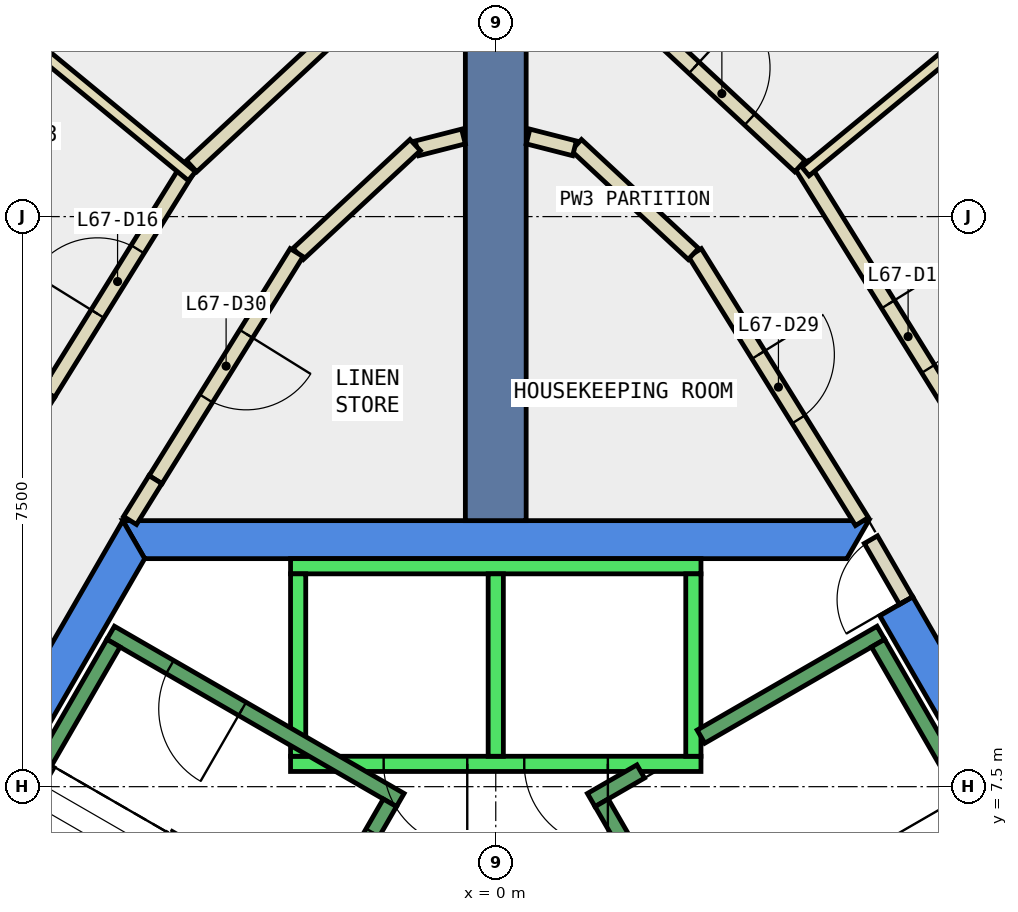
"""IFC4 building model, lengths in metres.
Left out: names, types, materials, properties, quantities, classifications, styles, units other than length and angle.
Written with IfcOpenShell. Run it as: python <this file> out.ifc"""

import sys

from ifc_helpers import new_model, si_unit, direction, frame, frame_2d, origin, place, context, subcontext, project, spatial, polyline, rectangle, outline, extrude, element, fill, save


model = new_model("IFC4")
c1 = context("Model", 3, precision=1e-05, world=origin(), true_north=direction((0.0, 1.0)))
c2 = subcontext(c1, "Body", "Model", "MODEL_VIEW")
j1 = project(units=[si_unit("LENGTHUNIT", "METRE"), si_unit("PLANEANGLEUNIT", "RADIAN")], contexts=[c1])
p1 = place(None, origin())
s1 = spatial("IfcSite", under=j1, at=p1, CompositionType="ELEMENT")
p2 = place(p1, origin())
s2 = spatial("IfcBuilding", under=s1, at=p2, CompositionType="ELEMENT")
p3 = place(p2, frame((0.0, 0.0, 290.0)))
s3 = spatial("IfcBuildingStorey", under=s2, at=p3, CompositionType="ELEMENT", Elevation=290.0)
p4 = place(p3, frame((0.0, 0.0, -0.34)))
e1 = element("IfcWall", 1, at=p4, inside=s3, PredefinedType="SHEAR", context=c2, shape_type="SweptSolid", body=[
    extrude(outline(polyline([(5.486, 9.998), (5.053, 9.748), (9.238, 2.5), (9.815, 2.5), (5.486, 9.998)])), origin(), (0.0, 0.0, 1.0), 3.6),
])
p5 = place(p3, frame((0.0, 0.0, -0.34)))
e2 = element("IfcWall", 2, at=p5, inside=s3, PredefinedType="SHEAR", context=c2, shape_type="SweptSolid", body=[
    extrude(outline(polyline([(4.907, 11.0), (-4.907, 11.0), (-4.619, 10.5), (4.619, 10.5), (4.907, 11.0)])), origin(), (0.0, 0.0, 1.0), 3.6),
])
p6 = place(p3, frame((0.0, 0.0, -0.34)))
e3 = element("IfcWall", 3, at=p6, inside=s3, PredefinedType="SHEAR", context=c2, shape_type="SweptSolid", body=[
    extrude(outline(polyline([(-9.236, 3.502), (-8.803, 3.253), (-4.619, 10.5), (-4.907, 11.0), (-9.236, 3.502)])), origin(), (0.0, 0.0, 1.0), 3.6),
])
p7 = place(p3, frame((0.0, 11.0, -0.34), z_axis=(0.0, 0.0, 1.0), x_axis=(0.0, 1.0, 0.0)))
e4 = element("IfcWall", 4, at=p7, inside=s3, PredefinedType="SHEAR", context=c2, shape_type="SweptSolid", body=[
    extrude(rectangle(XDim=9.0, YDim=0.8, at=frame_2d((4.5, 0.0))), origin(), (0.0, 0.0, 1.0), 3.6),
])
p8 = place(p3, frame((2.62, 14.526, 0.0), z_axis=(0.0, 0.0, 1.0), x_axis=(0.527726136463, -0.84941457775, 0.0)))
e5 = element("IfcWall", 5, at=p8, inside=s3, PredefinedType="PARTITIONING", context=c2, shape_type="SweptSolid", body=[
    extrude(rectangle(XDim=4.165, YDim=0.2, at=frame_2d((2.083, 0.0))), origin(), (0.0, 0.0, 1.0), 2.4),
])
p9 = place(p8, frame((1.583, 0.0, 0.0)))
e6 = element("IfcOpeningElement", 6, at=p9, cuts=e5, PredefinedType="OPENING", context=c2, shape_type="SweptSolid", body=[
    extrude(rectangle(XDim=1.0, YDim=2.1, at=frame_2d((0.5, 1.05))), frame((0.0, 0.11, 0.0), z_axis=(0.0, -1.0, 0.0), x_axis=(1.0, 0.0, 0.0)), (0.0, 0.0, 1.0), 0.22),
])
p10 = place(p3, frame((2.6, 14.509, 0.0), z_axis=(0.0, 0.0, 1.0), x_axis=(-0.732355024595, 0.680922989735, 0.0)))
e7 = element("IfcWall", 7, at=p10, inside=s3, PredefinedType="PARTITIONING", context=c2, shape_type="SweptSolid", body=[
    extrude(rectangle(XDim=2.103, YDim=0.2, at=frame_2d((1.051, 0.0))), origin(), (0.0, 0.0, 1.0), 3.26),
])
for number, where, z_axis, x_axis in (
    (8, (1.036, 15.898, 0.0), (0.0, 0.0, 1.0), (-0.969, 0.247, 0.0)),
    (9, (-0.425, 16.054, 0.0), (0.0, 0.0, 1.0), (-0.969, -0.247, 0.0)),
):
    element("IfcWall", number, at=place(p3, frame(where, z_axis=z_axis, x_axis=x_axis)), inside=s3, PredefinedType="PARTITIONING", context=c2, shape_type="SweptSolid", body=[
        extrude(rectangle(XDim=0.63, YDim=0.2, at=frame_2d((0.315, 0.0))), origin(), (0.0, 0.0, 1.0), 3.26),
    ])
p11 = place(p3, frame((-1.06, 15.941, 0.0), z_axis=(0.0, 0.0, 1.0), x_axis=(-0.732355024595, -0.680922989735, 0.0)))
e10 = element("IfcWall", 10, at=p11, inside=s3, PredefinedType="PARTITIONING", context=c2, shape_type="SweptSolid", body=[
    extrude(rectangle(XDim=2.103, YDim=0.2, at=frame_2d((1.051, 0.0))), origin(), (0.0, 0.0, 1.0), 3.26),
])
p12 = place(p3, frame((-2.62, 14.526, 0.0), z_axis=(0.0, 0.0, 1.0), x_axis=(-0.527787942423, -0.849376175692, 0.0)))
e11 = element("IfcWall", 11, at=p12, inside=s3, PredefinedType="PARTITIONING", context=c2, shape_type="SweptSolid", body=[
    extrude(rectangle(XDim=3.517, YDim=0.2, at=frame_2d((1.758, 0.0))), origin(), (0.0, 0.0, 1.0), 3.26),
])
p13 = place(p12, frame((1.258, 0.0, 0.0)))
e12 = element("IfcOpeningElement", 12, at=p13, cuts=e11, PredefinedType="OPENING", context=c2, shape_type="SweptSolid", body=[
    extrude(rectangle(XDim=1.0, YDim=2.1, at=frame_2d((0.5, 1.05))), frame((0.0, 0.11, 0.0), z_axis=(0.0, -1.0, 0.0), x_axis=(1.0, 0.0, 0.0)), (0.0, 0.0, 1.0), 0.22),
])
p14 = place(p3, frame((-4.478, 11.54, 0.0), z_axis=(0.0, 0.0, 1.0), x_axis=(-0.527362861778, -0.849640166198, 0.0)))
e13 = element("IfcWall", 13, at=p14, inside=s3, PredefinedType="PARTITIONING", context=c2, shape_type="SweptSolid", body=[
    extrude(rectangle(XDim=0.633, YDim=0.2, at=frame_2d((0.317, 0.0))), origin(), (0.0, 0.0, 1.0), 3.26),
])
p15 = place(p3, frame((4.022, 15.68, 0.0), z_axis=(0.0, 0.0, 1.0), x_axis=(0.527737948498, -0.849407239029, 0.0)))
e14 = element("IfcWall", 14, at=p15, inside=s3, PredefinedType="PARTITIONING", context=c2, shape_type="SweptSolid", body=[
    extrude(rectangle(XDim=5.217, YDim=0.2, at=frame_2d((2.608, 0.0))), origin(), (0.0, 0.0, 1.0), 3.26),
])
p16 = place(p15, frame((2.159, 0.0, 0.0)))
e15 = element("IfcOpeningElement", 15, at=p16, cuts=e14, PredefinedType="OPENING", context=c2, shape_type="SweptSolid", body=[
    extrude(rectangle(XDim=1.0, YDim=2.1, at=frame_2d((0.5, 1.05))), frame((0.0, 0.11, 0.0), z_axis=(0.0, -1.0, 0.0), x_axis=(1.0, 0.0, 0.0)), (0.0, 0.0, 1.0), 0.22),
])
p17 = place(p3, frame((1.949, 17.572, 0.0), z_axis=(0.0, 0.0, 1.0), x_axis=(0.732331154554, -0.680948661846, 0.0)))
e16 = element("IfcWall", 16, at=p17, inside=s3, PredefinedType="PARTITIONING", context=c2, shape_type="SweptSolid", body=[
    extrude(rectangle(XDim=2.803, YDim=0.2, at=frame_2d((1.402, 0.0))), origin(), (0.0, 0.0, 1.0), 3.26),
])
p18 = place(p17, frame((0.901, 0.0, 0.0)))
e17 = element("IfcOpeningElement", 17, at=p18, cuts=e16, PredefinedType="OPENING", context=c2, shape_type="SweptSolid", body=[
    extrude(rectangle(XDim=1.0, YDim=2.1, at=frame_2d((0.5, 1.05))), frame((0.0, 0.11, 0.0), z_axis=(0.0, -1.0, 0.0), x_axis=(1.0, 0.0, 0.0)), (0.0, 0.0, 1.0), 0.22),
])
p19 = place(p3, frame((-4.002, 15.663, 0.0), z_axis=(0.0, 0.0, 1.0), x_axis=(0.732331154554, 0.680948661846, 0.0)))
e18 = element("IfcWall", 18, at=p19, inside=s3, PredefinedType="PARTITIONING", context=c2, shape_type="SweptSolid", body=[
    extrude(rectangle(XDim=2.803, YDim=0.2, at=frame_2d((1.402, 0.0))), origin(), (0.0, 0.0, 1.0), 3.26),
])
p20 = place(p3, frame((-5.889, 12.675, 0.0), z_axis=(0.0, 0.0, 1.0), x_axis=(0.527550626699, 0.849523593709, 0.0)))
e19 = element("IfcWall", 19, at=p20, inside=s3, PredefinedType="PARTITIONING", context=c2, shape_type="SweptSolid", body=[
    extrude(rectangle(XDim=3.463, YDim=0.2, at=frame_2d((1.731, 0.0))), origin(), (0.0, 0.0, 1.0), 3.26),
])
p21 = place(p20, frame((1.231, 0.0, 0.0)))
e20 = element("IfcOpeningElement", 20, at=p21, cuts=e19, PredefinedType="OPENING", context=c2, shape_type="SweptSolid", body=[
    extrude(rectangle(XDim=1.0, YDim=2.1, at=frame_2d((0.5, 1.05))), frame((0.0, 0.11, 0.0), z_axis=(0.0, -1.0, 0.0), x_axis=(1.0, 0.0, 0.0)), (0.0, 0.0, 1.0), 0.22),
])
p22 = place(p3, frame((-7.472, 10.127, 0.0), z_axis=(0.0, 0.0, 1.0), x_axis=(0.527707224705, 0.849426326996, 0.0)))
e21 = element("IfcWall", 21, at=p22, inside=s3, PredefinedType="PARTITIONING", context=c2, shape_type="SweptSolid", body=[
    extrude(rectangle(XDim=3.0, YDim=0.2, at=frame_2d((1.5, 0.0))), origin(), (0.0, 0.0, 1.0), 3.26),
])
p23 = place(p3, frame((4.075, 15.595, 0.0), z_axis=(0.0, 0.0, 1.0), x_axis=(0.771899326406, 0.635744783616, 0.0)))
e22 = element("IfcWall", 22, at=p23, inside=s3, PredefinedType="PARTITIONING", context=c2, shape_type="SweptSolid", body=[
    extrude(rectangle(XDim=4.332, YDim=0.15, at=frame_2d((2.166, 0.0))), origin(), (0.0, 0.0, 1.0), 3.26),
])
p24 = place(p3, frame((-3.998, 15.532, 0.0), z_axis=(0.0, 0.0, 1.0), x_axis=(-0.771938186867, 0.635697597649, 0.0)))
e23 = element("IfcWall", 23, at=p24, inside=s3, PredefinedType="PARTITIONING", context=c2, shape_type="SweptSolid", body=[
    extrude(rectangle(XDim=4.432, YDim=0.15, at=frame_2d((2.216, 0.0))), origin(), (0.0, 0.0, 1.0), 3.26),
])
p25 = place(p3, frame((5.399, 9.948, 0.0), z_axis=(0.0, 0.0, 1.0), x_axis=(-0.499882215713, 0.866093395895, 0.0)))
e24 = element("IfcWall", 24, at=p25, inside=s3, PredefinedType="PARTITIONING", context=c2, shape_type="SweptSolid", body=[
    extrude(rectangle(XDim=0.926, YDim=0.2, at=frame_2d((0.463, 0.0))), origin(), (0.0, 0.0, 1.0), 2.4),
])
p26 = place(p25, frame((0.017, 0.0, 0.0)))
e25 = element("IfcOpeningElement", 25, at=p26, cuts=e24, PredefinedType="OPENING", context=c2, shape_type="SweptSolid", body=[
    extrude(rectangle(XDim=0.9, YDim=2.1, at=frame_2d((0.45, 1.05))), frame((0.0, 0.11, 0.0), z_axis=(0.0, -1.0, 0.0), x_axis=(1.0, 0.0, 0.0)), (0.0, 0.0, 1.0), 0.22),
])
p27 = place(p3, frame((2.7, 7.8, 0.0), z_axis=(0.0, 0.0, 1.0), x_axis=(-1.0, 0.0, 0.0)))
e26 = element("IfcWall", 26, at=p27, inside=s3, PredefinedType="STANDARD", context=c2, shape_type="SweptSolid", body=[
    extrude(rectangle(XDim=5.4, YDim=0.2, at=frame_2d((2.7, 0.0))), origin(), (0.0, 0.0, 1.0), 3.26),
])
p28 = place(p27, frame((1.225, 0.0, 0.0)))
e27 = element("IfcOpeningElement", 27, at=p28, cuts=e26, PredefinedType="OPENING", context=c2, shape_type="SweptSolid", body=[
    extrude(rectangle(XDim=1.1, YDim=2.1, at=frame_2d((0.55, 1.05))), frame((0.0, 0.11, 0.0), z_axis=(0.0, -1.0, 0.0), x_axis=(1.0, 0.0, 0.0)), (0.0, 0.0, 1.0), 0.22),
])
p29 = place(p27, frame((3.075, 0.0, 0.0)))
e28 = element("IfcOpeningElement", 28, at=p29, cuts=e26, PredefinedType="OPENING", context=c2, shape_type="SweptSolid", body=[
    extrude(rectangle(XDim=1.1, YDim=2.1, at=frame_2d((0.55, 1.05))), frame((0.0, 0.11, 0.0), z_axis=(0.0, -1.0, 0.0), x_axis=(1.0, 0.0, 0.0)), (0.0, 0.0, 1.0), 0.22),
])
p30 = place(p3, frame((2.7, 10.4, 0.0), z_axis=(0.0, 0.0, 1.0), x_axis=(-1.0, 0.0, 0.0)))
e29 = element("IfcWall", 29, at=p30, inside=s3, PredefinedType="STANDARD", context=c2, shape_type="SweptSolid", body=[
    extrude(rectangle(XDim=5.4, YDim=0.2, at=frame_2d((2.7, 0.0))), origin(), (0.0, 0.0, 1.0), 3.26),
])
for number, where, z_axis, x_axis in (
    (30, (2.6, 7.9, 0.0), (0.0, 0.0, 1.0), (0.0, 1.0, 0.0)),
    (31, (0.0, 7.9, 0.0), (0.0, 0.0, 1.0), (0.0, 1.0, 0.0)),
    (32, (-2.6, 7.9, 0.0), (0.0, 0.0, 1.0), (0.0, 1.0, 0.0)),
):
    element("IfcWall", number, at=place(p3, frame(where, z_axis=z_axis, x_axis=x_axis)), inside=s3, PredefinedType="STANDARD", context=c2, shape_type="SweptSolid", body=[
        extrude(rectangle(XDim=2.4, YDim=0.2, at=frame_2d((1.2, 0.0))), origin(), (0.0, 0.0, 1.0), 3.26),
    ])
p31 = place(p3, frame((2.7, 8.158, 0.0), z_axis=(0.0, 0.0, 1.0), x_axis=(0.86611865017, 0.499838457731, 0.0)))
e33 = element("IfcWall", 33, at=p31, inside=s3, PredefinedType="STANDARD", context=c2, shape_type="SweptSolid", body=[
    extrude(rectangle(XDim=2.733, YDim=0.2, at=frame_2d((1.366, 0.0))), origin(), (0.0, 0.0, 1.0), 3.26),
])
p32 = place(p3, frame((1.256, 7.324, 0.0), z_axis=(0.0, 0.0, 1.0), x_axis=(0.865915093549, 0.500191014278, 0.0)))
e34 = element("IfcWall", 34, at=p32, inside=s3, PredefinedType="STANDARD", context=c2, shape_type="SweptSolid", body=[
    extrude(rectangle(XDim=0.752, YDim=0.2, at=frame_2d((0.376, 0.0))), origin(), (0.0, 0.0, 1.0), 3.26),
])
p33 = place(p3, frame((4.843, 1.312, 0.0), z_axis=(0.0, 0.0, 1.0), x_axis=(-0.499963383562, 0.866046543262, 0.0)))
e35 = element("IfcWall", 35, at=p33, inside=s3, PredefinedType="STANDARD", context=c2, shape_type="SweptSolid", body=[
    extrude(rectangle(XDim=6.9, YDim=0.2, at=frame_2d((3.45, 0.0))), origin(), (0.0, 0.0, 1.0), 3.26),
])
p34 = place(p33, frame((0.45, 0.0, 0.0)))
e36 = element("IfcOpeningElement", 36, at=p34, cuts=e35, PredefinedType="OPENING", context=c2, shape_type="SweptSolid", body=[
    extrude(rectangle(XDim=1.1, YDim=2.2, at=frame_2d((0.55, 1.1))), frame((0.0, 0.11, 0.0), z_axis=(0.0, -1.0, 0.0), x_axis=(1.0, 0.0, 0.0)), (0.0, 0.0, 1.0), 0.22),
])
p35 = place(p3, frame((8.48, 3.412, 0.0), z_axis=(0.0, 0.0, 1.0), x_axis=(-0.499978703459, 0.866037698999, 0.0)))
e37 = element("IfcWall", 37, at=p35, inside=s3, PredefinedType="STANDARD", context=c2, shape_type="SweptSolid", body=[
    extrude(rectangle(XDim=6.9, YDim=0.2, at=frame_2d((3.45, 0.0))), origin(), (0.0, 0.0, 1.0), 3.26),
])
p36 = place(p3, frame((-1.256, 7.324, 0.0), z_axis=(0.0, 0.0, 1.0), x_axis=(-0.866046073146, 0.499964197906, 0.0)))
e38 = element("IfcWall", 38, at=p36, inside=s3, PredefinedType="STANDARD", context=c2, shape_type="SweptSolid", body=[
    extrude(rectangle(XDim=4.4, YDim=0.2, at=frame_2d((2.2, 0.0))), origin(), (0.0, 0.0, 1.0), 3.26),
])
p37 = place(p36, frame((2.4, 0.0, 0.0)))
e39 = element("IfcOpeningElement", 39, at=p37, cuts=e38, PredefinedType="OPENING", context=c2, shape_type="SweptSolid", body=[
    extrude(rectangle(XDim=1.1, YDim=2.2, at=frame_2d((0.55, 1.1))), frame((0.0, 0.11, 0.0), z_axis=(0.0, -1.0, 0.0), x_axis=(1.0, 0.0, 0.0)), (0.0, 0.0, 1.0), 0.22),
])
p38 = place(p3, frame((-1.393, 7.288, 0.0), z_axis=(0.0, 0.0, 1.0), x_axis=(-0.499963383562, -0.866046543262, 0.0)))
e40 = element("IfcWall", 40, at=p38, inside=s3, PredefinedType="STANDARD", context=c2, shape_type="SweptSolid", body=[
    extrude(rectangle(XDim=6.9, YDim=0.2, at=frame_2d((3.45, 0.0))), origin(), (0.0, 0.0, 1.0), 3.26),
])
p39 = place(p38, frame((0.45, 0.0, 0.0)))
e41 = element("IfcOpeningElement", 41, at=p39, cuts=e40, PredefinedType="OPENING", context=c2, shape_type="SweptSolid", body=[
    extrude(rectangle(XDim=1.1, YDim=2.2, at=frame_2d((0.55, 1.1))), frame((0.0, 0.11, 0.0), z_axis=(0.0, -1.0, 0.0), x_axis=(1.0, 0.0, 0.0)), (0.0, 0.0, 1.0), 0.22),
])
p40 = place(p3, frame((-5.03, 9.388, 0.0), z_axis=(0.0, 0.0, 1.0), x_axis=(-0.499978703459, -0.866037698999, 0.0)))
e42 = element("IfcWall", 42, at=p40, inside=s3, PredefinedType="STANDARD", context=c2, shape_type="SweptSolid", body=[
    extrude(rectangle(XDim=6.9, YDim=0.2, at=frame_2d((3.45, 0.0))), origin(), (0.0, 0.0, 1.0), 3.26),
])
p41 = place(p16, origin())
e43 = element("IfcDoor", 43, at=p41, inside=s3, OperationType="SINGLE_SWING_LEFT", PredefinedType="DOOR", context=c2, shape_type="SweptSolid", body=[
    extrude(rectangle(XDim=1.0, YDim=2.1, at=frame_2d((0.5, 1.05))), frame((0.0, 0.025, 0.0), z_axis=(0.0, -1.0, 0.0), x_axis=(1.0, 0.0, 0.0)), (0.0, 0.0, 1.0), 0.05),
])
fill(e15, e43)
p42 = place(p18, origin())
e44 = element("IfcDoor", 44, at=p42, inside=s3, OperationType="SINGLE_SWING_LEFT", PredefinedType="DOOR", context=c2, shape_type="SweptSolid", body=[
    extrude(rectangle(XDim=1.0, YDim=2.1, at=frame_2d((0.5, 1.05))), frame((0.0, 0.025, 0.0), z_axis=(0.0, -1.0, 0.0), x_axis=(1.0, 0.0, 0.0)), (0.0, 0.0, 1.0), 0.05),
])
fill(e17, e44)
p43 = place(p21, origin())
e45 = element("IfcDoor", 45, at=p43, inside=s3, OperationType="SINGLE_SWING_LEFT", PredefinedType="DOOR", context=c2, shape_type="SweptSolid", body=[
    extrude(rectangle(XDim=1.0, YDim=2.1, at=frame_2d((0.5, 1.05))), frame((0.0, 0.025, 0.0), z_axis=(0.0, -1.0, 0.0), x_axis=(1.0, 0.0, 0.0)), (0.0, 0.0, 1.0), 0.05),
])
fill(e20, e45)
p44 = place(p9, origin())
e46 = element("IfcDoor", 46, at=p44, inside=s3, OperationType="SINGLE_SWING_RIGHT", PredefinedType="DOOR", context=c2, shape_type="SweptSolid", body=[
    extrude(rectangle(XDim=1.0, YDim=2.1, at=frame_2d((0.5, 1.05))), frame((0.0, 0.025, 0.0), z_axis=(0.0, -1.0, 0.0), x_axis=(1.0, 0.0, 0.0)), (0.0, 0.0, 1.0), 0.05),
])
fill(e6, e46)
p45 = place(p13, origin())
e47 = element("IfcDoor", 47, at=p45, inside=s3, OperationType="SINGLE_SWING_RIGHT", PredefinedType="DOOR", context=c2, shape_type="SweptSolid", body=[
    extrude(rectangle(XDim=1.0, YDim=2.1, at=frame_2d((0.5, 1.05))), frame((0.0, 0.025, 0.0), z_axis=(0.0, -1.0, 0.0), x_axis=(1.0, 0.0, 0.0)), (0.0, 0.0, 1.0), 0.05),
])
fill(e12, e47)
p46 = place(p26, origin())
e48 = element("IfcDoor", 48, at=p46, inside=s3, OperationType="SINGLE_SWING_LEFT", PredefinedType="DOOR", context=c2, shape_type="SweptSolid", body=[
    extrude(rectangle(XDim=0.9, YDim=2.1, at=frame_2d((0.45, 1.05))), frame((0.0, 0.025, 0.0), z_axis=(0.0, -1.0, 0.0), x_axis=(1.0, 0.0, 0.0)), (0.0, 0.0, 1.0), 0.05),
])
fill(e25, e48)
p47 = place(p28, origin())
e49 = element("IfcDoor", 49, at=p47, inside=s3, OperationType="SLIDING_TO_LEFT", PredefinedType="DOOR", context=c2, shape_type="SweptSolid", body=[
    extrude(rectangle(XDim=1.1, YDim=2.1, at=frame_2d((0.55, 1.05))), frame((0.0, 0.025, 0.0), z_axis=(0.0, -1.0, 0.0), x_axis=(1.0, 0.0, 0.0)), (0.0, 0.0, 1.0), 0.05),
])
fill(e27, e49)
p48 = place(p29, origin())
e50 = element("IfcDoor", 50, at=p48, inside=s3, OperationType="SLIDING_TO_LEFT", PredefinedType="DOOR", context=c2, shape_type="SweptSolid", body=[
    extrude(rectangle(XDim=1.1, YDim=2.1, at=frame_2d((0.55, 1.05))), frame((0.0, 0.025, 0.0), z_axis=(0.0, -1.0, 0.0), x_axis=(1.0, 0.0, 0.0)), (0.0, 0.0, 1.0), 0.05),
])
fill(e28, e50)
p49 = place(p39, origin())
e51 = element("IfcDoor", 51, at=p49, inside=s3, OperationType="SINGLE_SWING_LEFT", PredefinedType="DOOR", context=c2, shape_type="SweptSolid", body=[
    extrude(rectangle(XDim=1.1, YDim=2.2, at=frame_2d((0.55, 1.1))), frame((0.0, 0.025, 0.0), z_axis=(0.0, -1.0, 0.0), x_axis=(1.0, 0.0, 0.0)), (0.0, 0.0, 1.0), 0.05),
])
fill(e41, e51)
p50 = place(p37, origin())
e52 = element("IfcDoor", 52, at=p50, inside=s3, OperationType="SINGLE_SWING_LEFT", PredefinedType="DOOR", context=c2, shape_type="SweptSolid", body=[
    extrude(rectangle(XDim=1.1, YDim=2.2, at=frame_2d((0.55, 1.1))), frame((0.0, 0.025, 0.0), z_axis=(0.0, -1.0, 0.0), x_axis=(1.0, 0.0, 0.0)), (0.0, 0.0, 1.0), 0.05),
])
fill(e39, e52)
save(model, sys.argv[1])
